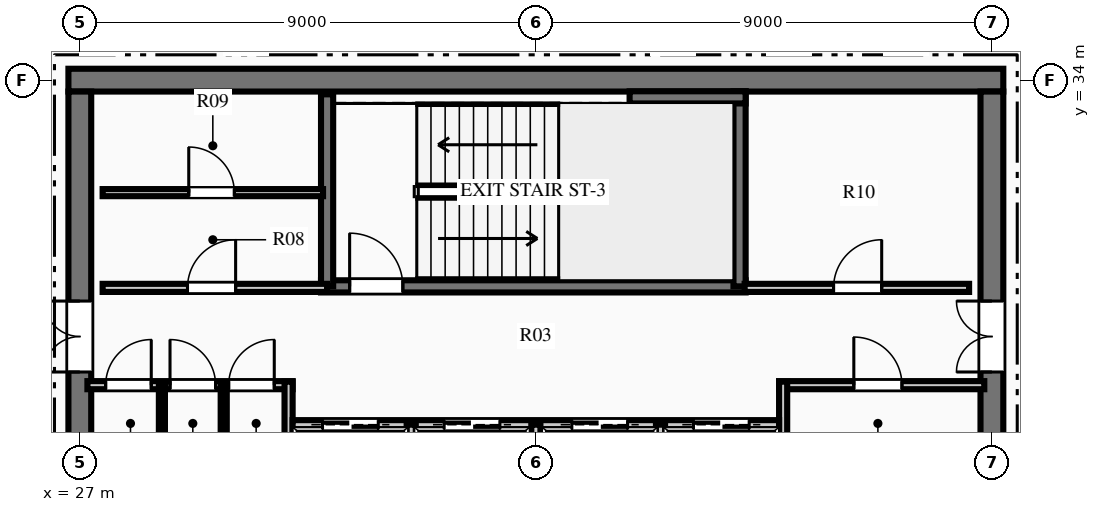
"""IFC4 building model, lengths in metres.
Left out: names, types, materials, properties, quantities, classifications, styles, units other than length and angle.
Written with IfcOpenShell. Run it as: python <this file> out.ifc"""

import sys

from ifc_helpers import new_model, si_unit, direction, frame, frame_2d, origin, place, context, subcontext, project, spatial, rectangle, extrude, element, fill, save


model = new_model("IFC4")
c1 = context("Model", 3, precision=1e-05, world=origin(), true_north=direction((0.0, 1.0)))
c2 = subcontext(c1, "Body", "Model", "MODEL_VIEW")
j1 = project(units=[si_unit("LENGTHUNIT", "METRE"), si_unit("PLANEANGLEUNIT", "RADIAN")], contexts=[c1])
p1 = place(None, origin())
s1 = spatial("IfcSite", under=j1, at=p1, CompositionType="ELEMENT")
p2 = place(p1, origin())
s2 = spatial("IfcBuilding", under=s1, at=p2, CompositionType="ELEMENT")
p3 = place(p2, frame((0.0, 0.0, 325.2)))
s3 = spatial("IfcBuildingStorey", under=s2, at=p3, CompositionType="ELEMENT", Elevation=325.2)
p4 = place(p3, frame((26.775, 34.0, 0.0), z_axis=(0.0, 0.0, 1.0), x_axis=(1.0, 0.0, 0.0)))
e1 = element("IfcWall", 1, at=p4, inside=s3, PredefinedType="SHEAR", context=c2, shape_type="SweptSolid", body=[
    extrude(rectangle(XDim=18.45, YDim=0.45, at=frame_2d((9.225, 0.0))), origin(), (0.0, 0.0, 1.0), 3.75),
])
p5 = place(p3, frame((27.0, 18.225, 0.0), z_axis=(0.0, 0.0, 1.0), x_axis=(0.0, 1.0, 0.0)))
e2 = element("IfcWall", 2, at=p5, inside=s3, PredefinedType="SHEAR", context=c2, shape_type="SweptSolid", body=[
    extrude(rectangle(XDim=15.55, YDim=0.45, at=frame_2d((7.775, 0.0))), origin(), (0.0, 0.0, 1.0), 3.75),
])
p6 = place(p5, frame((10.015, 0.0, 0.0)))
e3 = element("IfcOpeningElement", 3, at=p6, cuts=e2, PredefinedType="OPENING", context=c2, shape_type="SweptSolid", body=[
    extrude(rectangle(XDim=1.4, YDim=2.2, at=frame_2d((0.7, 1.1))), frame((0.0, 0.235, 0.0), z_axis=(0.0, -1.0, 0.0), x_axis=(1.0, 0.0, 0.0)), (0.0, 0.0, 1.0), 0.47),
])
p7 = place(p3, frame((45.0, 18.225, 0.0), z_axis=(0.0, 0.0, 1.0), x_axis=(0.0, 1.0, 0.0)))
e4 = element("IfcWall", 4, at=p7, inside=s3, PredefinedType="SHEAR", context=c2, shape_type="SweptSolid", body=[
    extrude(rectangle(XDim=15.55, YDim=0.45, at=frame_2d((7.775, 0.0))), origin(), (0.0, 0.0, 1.0), 3.75),
])
p8 = place(p7, frame((10.015, 0.0, 0.0)))
e5 = element("IfcOpeningElement", 5, at=p8, cuts=e4, PredefinedType="OPENING", context=c2, shape_type="SweptSolid", body=[
    extrude(rectangle(XDim=1.4, YDim=2.2, at=frame_2d((0.7, 1.1))), frame((0.0, 0.235, 0.0), z_axis=(0.0, -1.0, 0.0), x_axis=(1.0, 0.0, 0.0)), (0.0, 0.0, 1.0), 0.47),
])
p9 = place(p3, frame((31.76, 29.93, 0.0), z_axis=(0.0, 0.0, 1.0), x_axis=(1.0, 0.0, 0.0)))
e6 = element("IfcWall", 6, at=p9, inside=s3, PredefinedType="SHEAR", context=c2, shape_type="SweptSolid", body=[
    extrude(rectangle(XDim=8.38, YDim=0.24, at=frame_2d((4.19, 0.0))), origin(), (0.0, 0.0, 1.0), 3.75),
])
p10 = place(p9, frame((0.565, 0.0, 0.0)))
e7 = element("IfcOpeningElement", 7, at=p10, cuts=e6, PredefinedType="OPENING", context=c2, shape_type="SweptSolid", body=[
    extrude(rectangle(XDim=1.05, YDim=2.15, at=frame_2d((0.525, 1.075))), frame((0.0, 0.13, 0.0), z_axis=(0.0, -1.0, 0.0), x_axis=(1.0, 0.0, 0.0)), (0.0, 0.0, 1.0), 0.26),
])
p11 = place(p3, frame((31.88, 29.93, 0.0), z_axis=(0.0, 0.0, 1.0), x_axis=(0.0, 1.0, 0.0)))
e8 = element("IfcWall", 8, at=p11, inside=s3, PredefinedType="SHEAR", context=c2, shape_type="SweptSolid", body=[
    extrude(rectangle(XDim=3.79, YDim=0.24, at=frame_2d((1.895, 0.0))), origin(), (0.0, 0.0, 1.0), 3.75),
])
p12 = place(p3, frame((40.02, 29.93, 0.0), z_axis=(0.0, 0.0, 1.0), x_axis=(0.0, 1.0, 0.0)))
e9 = element("IfcWall", 9, at=p12, inside=s3, PredefinedType="SHEAR", context=c2, shape_type="SweptSolid", body=[
    extrude(rectangle(XDim=3.85, YDim=0.24, at=frame_2d((1.925, 0.0))), origin(), (0.0, 0.0, 1.0), 3.75),
])
p13 = place(p3, frame((37.85, 33.66, 0.0), z_axis=(0.0, 0.0, 1.0), x_axis=(1.0, 0.0, 0.0)))
e10 = element("IfcWall", 10, at=p13, inside=s3, PredefinedType="SHEAR", context=c2, shape_type="SweptSolid", body=[
    extrude(rectangle(XDim=2.29, YDim=0.24, at=frame_2d((1.145, 0.0))), origin(), (0.0, 0.0, 1.0), 3.75),
])
p14 = place(p3, frame((27.15, 27.98, 0.0), z_axis=(0.0, 0.0, 1.0), x_axis=(1.0, 0.0, 0.0)))
e11 = element("IfcWall", 11, at=p14, inside=s3, PredefinedType="PARTITIONING", context=c2, shape_type="SweptSolid", body=[
    extrude(rectangle(XDim=4.05, YDim=0.16, at=frame_2d((2.025, 0.0))), origin(), (0.0, 0.0, 1.0), 3.49),
])
p15 = place(p14, frame((0.36, 0.0, 0.0)))
e12 = element("IfcOpeningElement", 12, at=p15, cuts=e11, PredefinedType="OPENING", context=c2, shape_type="SweptSolid", body=[
    extrude(rectangle(XDim=0.9, YDim=2.15, at=frame_2d((0.45, 1.075))), frame((0.0, 0.09, 0.0), z_axis=(0.0, -1.0, 0.0), x_axis=(1.0, 0.0, 0.0)), (0.0, 0.0, 1.0), 0.18),
])
p16 = place(p14, frame((1.63, 0.0, 0.0)))
e13 = element("IfcOpeningElement", 13, at=p16, cuts=e11, PredefinedType="OPENING", context=c2, shape_type="SweptSolid", body=[
    extrude(rectangle(XDim=0.9, YDim=2.15, at=frame_2d((0.45, 1.075))), frame((0.0, 0.09, 0.0), z_axis=(0.0, -1.0, 0.0), x_axis=(1.0, 0.0, 0.0)), (0.0, 0.0, 1.0), 0.18),
])
p17 = place(p14, frame((2.788, 0.0, 0.0)))
e14 = element("IfcOpeningElement", 14, at=p17, cuts=e11, PredefinedType="OPENING", context=c2, shape_type="SweptSolid", body=[
    extrude(rectangle(XDim=0.9, YDim=2.15, at=frame_2d((0.45, 1.075))), frame((0.0, 0.09, 0.0), z_axis=(0.0, -1.0, 0.0), x_axis=(1.0, 0.0, 0.0)), (0.0, 0.0, 1.0), 0.18),
])
p18 = place(p3, frame((31.12, 26.54, 0.0), z_axis=(0.0, 0.0, 1.0), x_axis=(0.0, 1.0, 0.0)))
e15 = element("IfcWall", 15, at=p18, inside=s3, PredefinedType="PARTITIONING", context=c2, shape_type="SweptSolid", body=[
    extrude(rectangle(XDim=1.51, YDim=0.16, at=frame_2d((0.755, 0.0))), origin(), (0.0, 0.0, 1.0), 3.49),
])
p19 = place(p3, frame((40.8, 27.98, 0.0), z_axis=(0.0, 0.0, 1.0), x_axis=(1.0, 0.0, 0.0)))
e16 = element("IfcWall", 16, at=p19, inside=s3, PredefinedType="PARTITIONING", context=c2, shape_type="SweptSolid", body=[
    extrude(rectangle(XDim=4.05, YDim=0.16, at=frame_2d((2.025, 0.0))), origin(), (0.0, 0.0, 1.0), 3.49),
])
p20 = place(p19, frame((1.475, 0.0, 0.0)))
e17 = element("IfcOpeningElement", 17, at=p20, cuts=e16, PredefinedType="OPENING", context=c2, shape_type="SweptSolid", body=[
    extrude(rectangle(XDim=0.95, YDim=2.15, at=frame_2d((0.475, 1.075))), frame((0.0, 0.09, 0.0), z_axis=(0.0, -1.0, 0.0), x_axis=(1.0, 0.0, 0.0)), (0.0, 0.0, 1.0), 0.18),
])
p21 = place(p3, frame((40.88, 26.54, 0.0), z_axis=(0.0, 0.0, 1.0), x_axis=(0.0, 1.0, 0.0)))
e18 = element("IfcWall", 18, at=p21, inside=s3, PredefinedType="PARTITIONING", context=c2, shape_type="SweptSolid", body=[
    extrude(rectangle(XDim=1.51, YDim=0.16, at=frame_2d((0.755, 0.0))), origin(), (0.0, 0.0, 1.0), 3.49),
])
for number, where, z_axis, x_axis in (
    (19, (28.62, 26.54, 0.0), (0.0, 0.0, 1.0), (0.0, 1.0, 0.0)),
    (20, (29.84, 26.54, 0.0), (0.0, 0.0, 1.0), (0.0, 1.0, 0.0)),
):
    element("IfcWall", number, at=place(p3, frame(where, z_axis=z_axis, x_axis=x_axis)), inside=s3, PredefinedType="PARTITIONING", context=c2, shape_type="SweptSolid", body=[
        extrude(rectangle(XDim=1.44, YDim=0.12, at=frame_2d((0.72, 0.0))), origin(), (0.0, 0.0, 1.0), 3.49),
    ])
p22 = place(p3, frame((27.45, 29.9, 0.0), z_axis=(0.0, 0.0, 1.0), x_axis=(1.0, 0.0, 0.0)))
e21 = element("IfcWall", 21, at=p22, inside=s3, PredefinedType="PARTITIONING", context=c2, shape_type="SweptSolid", body=[
    extrude(rectangle(XDim=4.43, YDim=0.16, at=frame_2d((2.215, 0.0))), origin(), (0.0, 0.0, 1.0), 3.49),
])
p23 = place(p22, frame((1.675, 0.0, 0.0)))
e22 = element("IfcOpeningElement", 22, at=p23, cuts=e21, PredefinedType="OPENING", context=c2, shape_type="SweptSolid", body=[
    extrude(rectangle(XDim=0.95, YDim=2.15, at=frame_2d((0.475, 1.075))), frame((0.0, 0.09, 0.0), z_axis=(0.0, -1.0, 0.0), x_axis=(1.0, 0.0, 0.0)), (0.0, 0.0, 1.0), 0.18),
])
p24 = place(p3, frame((27.45, 31.78, 0.0), z_axis=(0.0, 0.0, 1.0), x_axis=(1.0, 0.0, 0.0)))
e23 = element("IfcWall", 23, at=p24, inside=s3, PredefinedType="PARTITIONING", context=c2, shape_type="SweptSolid", body=[
    extrude(rectangle(XDim=4.35, YDim=0.14, at=frame_2d((2.175, 0.0))), origin(), (0.0, 0.0, 1.0), 3.49),
])
p25 = place(p24, frame((1.7, 0.0, 0.0)))
e24 = element("IfcOpeningElement", 24, at=p25, cuts=e23, PredefinedType="OPENING", context=c2, shape_type="SweptSolid", body=[
    extrude(rectangle(XDim=0.9, YDim=2.15, at=frame_2d((0.45, 1.075))), frame((0.0, 0.08, 0.0), z_axis=(0.0, -1.0, 0.0), x_axis=(1.0, 0.0, 0.0)), (0.0, 0.0, 1.0), 0.16),
])
p26 = place(p3, frame((40.12, 29.9, 0.0), z_axis=(0.0, 0.0, 1.0), x_axis=(1.0, 0.0, 0.0)))
e25 = element("IfcWall", 25, at=p26, inside=s3, PredefinedType="PARTITIONING", context=c2, shape_type="SweptSolid", body=[
    extrude(rectangle(XDim=4.43, YDim=0.16, at=frame_2d((2.215, 0.0))), origin(), (0.0, 0.0, 1.0), 3.49),
])
p27 = place(p26, frame((1.755, 0.0, 0.0)))
e26 = element("IfcOpeningElement", 26, at=p27, cuts=e25, PredefinedType="OPENING", context=c2, shape_type="SweptSolid", body=[
    extrude(rectangle(XDim=0.95, YDim=2.15, at=frame_2d((0.475, 1.075))), frame((0.0, 0.09, 0.0), z_axis=(0.0, -1.0, 0.0), x_axis=(1.0, 0.0, 0.0)), (0.0, 0.0, 1.0), 0.18),
])
p28 = place(p3, frame((31.2, 27.2, 0.0), z_axis=(0.0, 0.0, 1.0), x_axis=(1.0, 0.0, 0.0)))
e27 = element("IfcWall", 27, at=p28, inside=s3, PredefinedType="PARTITIONING", context=c2, shape_type="SweptSolid", body=[
    extrude(rectangle(XDim=9.6, YDim=0.18, at=frame_2d((4.8, 0.0))), origin(), (0.0, 0.0, 1.0), 3.49),
])
p29 = place(p28, frame((0.59, 0.0, 0.0)))
e28 = element("IfcOpeningElement", 28, at=p29, cuts=e27, PredefinedType="OPENING", context=c2, shape_type="SweptSolid", body=[
    extrude(rectangle(XDim=1.1, YDim=2.15, at=frame_2d((0.55, 1.075))), frame((0.0, 0.1, 0.0), z_axis=(0.0, -1.0, 0.0), x_axis=(1.0, 0.0, 0.0)), (0.0, 0.0, 1.0), 0.2),
])
p30 = place(p28, frame((2.99, 0.0, 0.0)))
e29 = element("IfcOpeningElement", 29, at=p30, cuts=e27, PredefinedType="OPENING", context=c2, shape_type="SweptSolid", body=[
    extrude(rectangle(XDim=1.1, YDim=2.15, at=frame_2d((0.55, 1.075))), frame((0.0, 0.1, 0.0), z_axis=(0.0, -1.0, 0.0), x_axis=(1.0, 0.0, 0.0)), (0.0, 0.0, 1.0), 0.2),
])
p31 = place(p28, frame((5.51, 0.0, 0.0)))
e30 = element("IfcOpeningElement", 30, at=p31, cuts=e27, PredefinedType="OPENING", context=c2, shape_type="SweptSolid", body=[
    extrude(rectangle(XDim=1.1, YDim=2.15, at=frame_2d((0.55, 1.075))), frame((0.0, 0.1, 0.0), z_axis=(0.0, -1.0, 0.0), x_axis=(1.0, 0.0, 0.0)), (0.0, 0.0, 1.0), 0.2),
])
p32 = place(p28, frame((7.91, 0.0, 0.0)))
e31 = element("IfcOpeningElement", 31, at=p32, cuts=e27, PredefinedType="OPENING", context=c2, shape_type="SweptSolid", body=[
    extrude(rectangle(XDim=1.1, YDim=2.15, at=frame_2d((0.55, 1.075))), frame((0.0, 0.1, 0.0), z_axis=(0.0, -1.0, 0.0), x_axis=(1.0, 0.0, 0.0)), (0.0, 0.0, 1.0), 0.2),
])
for number, where, z_axis, x_axis in (
    (32, (33.54, 25.3, 0.0), (0.0, 0.0, 1.0), (0.0, 1.0, 0.0)),
    (33, (36.0, 25.3, 0.0), (0.0, 0.0, 1.0), (0.0, 1.0, 0.0)),
    (34, (38.46, 25.3, 0.0), (0.0, 0.0, 1.0), (0.0, 1.0, 0.0)),
):
    element("IfcWall", number, at=place(p3, frame(where, z_axis=z_axis, x_axis=x_axis)), inside=s3, PredefinedType="PARTITIONING", context=c2, shape_type="SweptSolid", body=[
        extrude(rectangle(XDim=1.9, YDim=0.18, at=frame_2d((0.95, 0.0))), origin(), (0.0, 0.0, 1.0), 3.49),
    ])
p33 = place(p15, origin())
e35 = element("IfcDoor", 35, at=p33, inside=s3, OperationType="SINGLE_SWING_RIGHT", PredefinedType="DOOR", context=c2, shape_type="SweptSolid", body=[
    extrude(rectangle(XDim=0.9, YDim=2.15, at=frame_2d((0.45, 1.075))), frame((0.0, 0.025, 0.0), z_axis=(0.0, -1.0, 0.0), x_axis=(1.0, 0.0, 0.0)), (0.0, 0.0, 1.0), 0.05),
])
fill(e12, e35)
p34 = place(p16, origin())
e36 = element("IfcDoor", 36, at=p34, inside=s3, OperationType="SINGLE_SWING_LEFT", PredefinedType="DOOR", context=c2, shape_type="SweptSolid", body=[
    extrude(rectangle(XDim=0.9, YDim=2.15, at=frame_2d((0.45, 1.075))), frame((0.0, 0.025, 0.0), z_axis=(0.0, -1.0, 0.0), x_axis=(1.0, 0.0, 0.0)), (0.0, 0.0, 1.0), 0.05),
])
fill(e13, e36)
p35 = place(p17, origin())
e37 = element("IfcDoor", 37, at=p35, inside=s3, OperationType="SINGLE_SWING_RIGHT", PredefinedType="DOOR", context=c2, shape_type="SweptSolid", body=[
    extrude(rectangle(XDim=0.9, YDim=2.15, at=frame_2d((0.45, 1.075))), frame((0.0, 0.025, 0.0), z_axis=(0.0, -1.0, 0.0), x_axis=(1.0, 0.0, 0.0)), (0.0, 0.0, 1.0), 0.05),
])
fill(e14, e37)
p36 = place(p20, origin())
e38 = element("IfcDoor", 38, at=p36, inside=s3, OperationType="SINGLE_SWING_LEFT", PredefinedType="DOOR", context=c2, shape_type="SweptSolid", body=[
    extrude(rectangle(XDim=0.95, YDim=2.15, at=frame_2d((0.475, 1.075))), frame((0.0, 0.025, 0.0), z_axis=(0.0, -1.0, 0.0), x_axis=(1.0, 0.0, 0.0)), (0.0, 0.0, 1.0), 0.05),
])
fill(e17, e38)
p37 = place(p23, origin())
e39 = element("IfcDoor", 39, at=p37, inside=s3, OperationType="SINGLE_SWING_RIGHT", PredefinedType="DOOR", context=c2, shape_type="SweptSolid", body=[
    extrude(rectangle(XDim=0.95, YDim=2.15, at=frame_2d((0.475, 1.075))), frame((0.0, 0.025, 0.0), z_axis=(0.0, -1.0, 0.0), x_axis=(1.0, 0.0, 0.0)), (0.0, 0.0, 1.0), 0.05),
])
fill(e22, e39)
p38 = place(p25, origin())
e40 = element("IfcDoor", 40, at=p38, inside=s3, OperationType="SINGLE_SWING_LEFT", PredefinedType="DOOR", context=c2, shape_type="SweptSolid", body=[
    extrude(rectangle(XDim=0.9, YDim=2.15, at=frame_2d((0.45, 1.075))), frame((0.0, 0.025, 0.0), z_axis=(0.0, -1.0, 0.0), x_axis=(1.0, 0.0, 0.0)), (0.0, 0.0, 1.0), 0.05),
])
fill(e24, e40)
p39 = place(p27, origin())
e41 = element("IfcDoor", 41, at=p39, inside=s3, OperationType="SINGLE_SWING_RIGHT", PredefinedType="DOOR", context=c2, shape_type="SweptSolid", body=[
    extrude(rectangle(XDim=0.95, YDim=2.15, at=frame_2d((0.475, 1.075))), frame((0.0, 0.025, 0.0), z_axis=(0.0, -1.0, 0.0), x_axis=(1.0, 0.0, 0.0)), (0.0, 0.0, 1.0), 0.05),
])
fill(e26, e41)
p40 = place(p10, origin())
e42 = element("IfcDoor", 42, at=p40, inside=s3, OperationType="SINGLE_SWING_LEFT", PredefinedType="DOOR", context=c2, shape_type="SweptSolid", body=[
    extrude(rectangle(XDim=1.05, YDim=2.15, at=frame_2d((0.525, 1.075))), frame((0.0, 0.025, 0.0), z_axis=(0.0, -1.0, 0.0), x_axis=(1.0, 0.0, 0.0)), (0.0, 0.0, 1.0), 0.05),
])
fill(e7, e42)
p41 = place(p6, origin())
e43 = element("IfcDoor", 43, at=p41, inside=s3, OperationType="DOUBLE_DOOR_SINGLE_SWING", PredefinedType="DOOR", context=c2, shape_type="SweptSolid", body=[
    extrude(rectangle(XDim=1.4, YDim=2.2, at=frame_2d((0.7, 1.1))), frame((0.0, 0.025, 0.0), z_axis=(0.0, -1.0, 0.0), x_axis=(1.0, 0.0, 0.0)), (0.0, 0.0, 1.0), 0.05),
])
fill(e3, e43)
p42 = place(p8, origin())
e44 = element("IfcDoor", 44, at=p42, inside=s3, OperationType="DOUBLE_DOOR_SINGLE_SWING", PredefinedType="DOOR", context=c2, shape_type="SweptSolid", body=[
    extrude(rectangle(XDim=1.4, YDim=2.2, at=frame_2d((0.7, 1.1))), frame((0.0, 0.025, 0.0), z_axis=(0.0, -1.0, 0.0), x_axis=(1.0, 0.0, 0.0)), (0.0, 0.0, 1.0), 0.05),
])
fill(e5, e44)
p43 = place(p29, origin())
e45 = element("IfcDoor", 45, at=p43, inside=s3, OperationType="SLIDING_TO_LEFT", PredefinedType="DOOR", context=c2, shape_type="SweptSolid", body=[
    extrude(rectangle(XDim=1.1, YDim=2.15, at=frame_2d((0.55, 1.075))), frame((0.0, 0.025, 0.0), z_axis=(0.0, -1.0, 0.0), x_axis=(1.0, 0.0, 0.0)), (0.0, 0.0, 1.0), 0.05),
])
fill(e28, e45)
p44 = place(p30, origin())
e46 = element("IfcDoor", 46, at=p44, inside=s3, OperationType="SLIDING_TO_LEFT", PredefinedType="DOOR", context=c2, shape_type="SweptSolid", body=[
    extrude(rectangle(XDim=1.1, YDim=2.15, at=frame_2d((0.55, 1.075))), frame((0.0, 0.025, 0.0), z_axis=(0.0, -1.0, 0.0), x_axis=(1.0, 0.0, 0.0)), (0.0, 0.0, 1.0), 0.05),
])
fill(e29, e46)
p45 = place(p31, origin())
e47 = element("IfcDoor", 47, at=p45, inside=s3, OperationType="SLIDING_TO_LEFT", PredefinedType="DOOR", context=c2, shape_type="SweptSolid", body=[
    extrude(rectangle(XDim=1.1, YDim=2.15, at=frame_2d((0.55, 1.075))), frame((0.0, 0.025, 0.0), z_axis=(0.0, -1.0, 0.0), x_axis=(1.0, 0.0, 0.0)), (0.0, 0.0, 1.0), 0.05),
])
fill(e30, e47)
p46 = place(p32, origin())
e48 = element("IfcDoor", 48, at=p46, inside=s3, OperationType="SLIDING_TO_LEFT", PredefinedType="DOOR", context=c2, shape_type="SweptSolid", body=[
    extrude(rectangle(XDim=1.1, YDim=2.15, at=frame_2d((0.55, 1.075))), frame((0.0, 0.025, 0.0), z_axis=(0.0, -1.0, 0.0), x_axis=(1.0, 0.0, 0.0)), (0.0, 0.0, 1.0), 0.05),
])
fill(e31, e48)
save(model, sys.argv[1])
